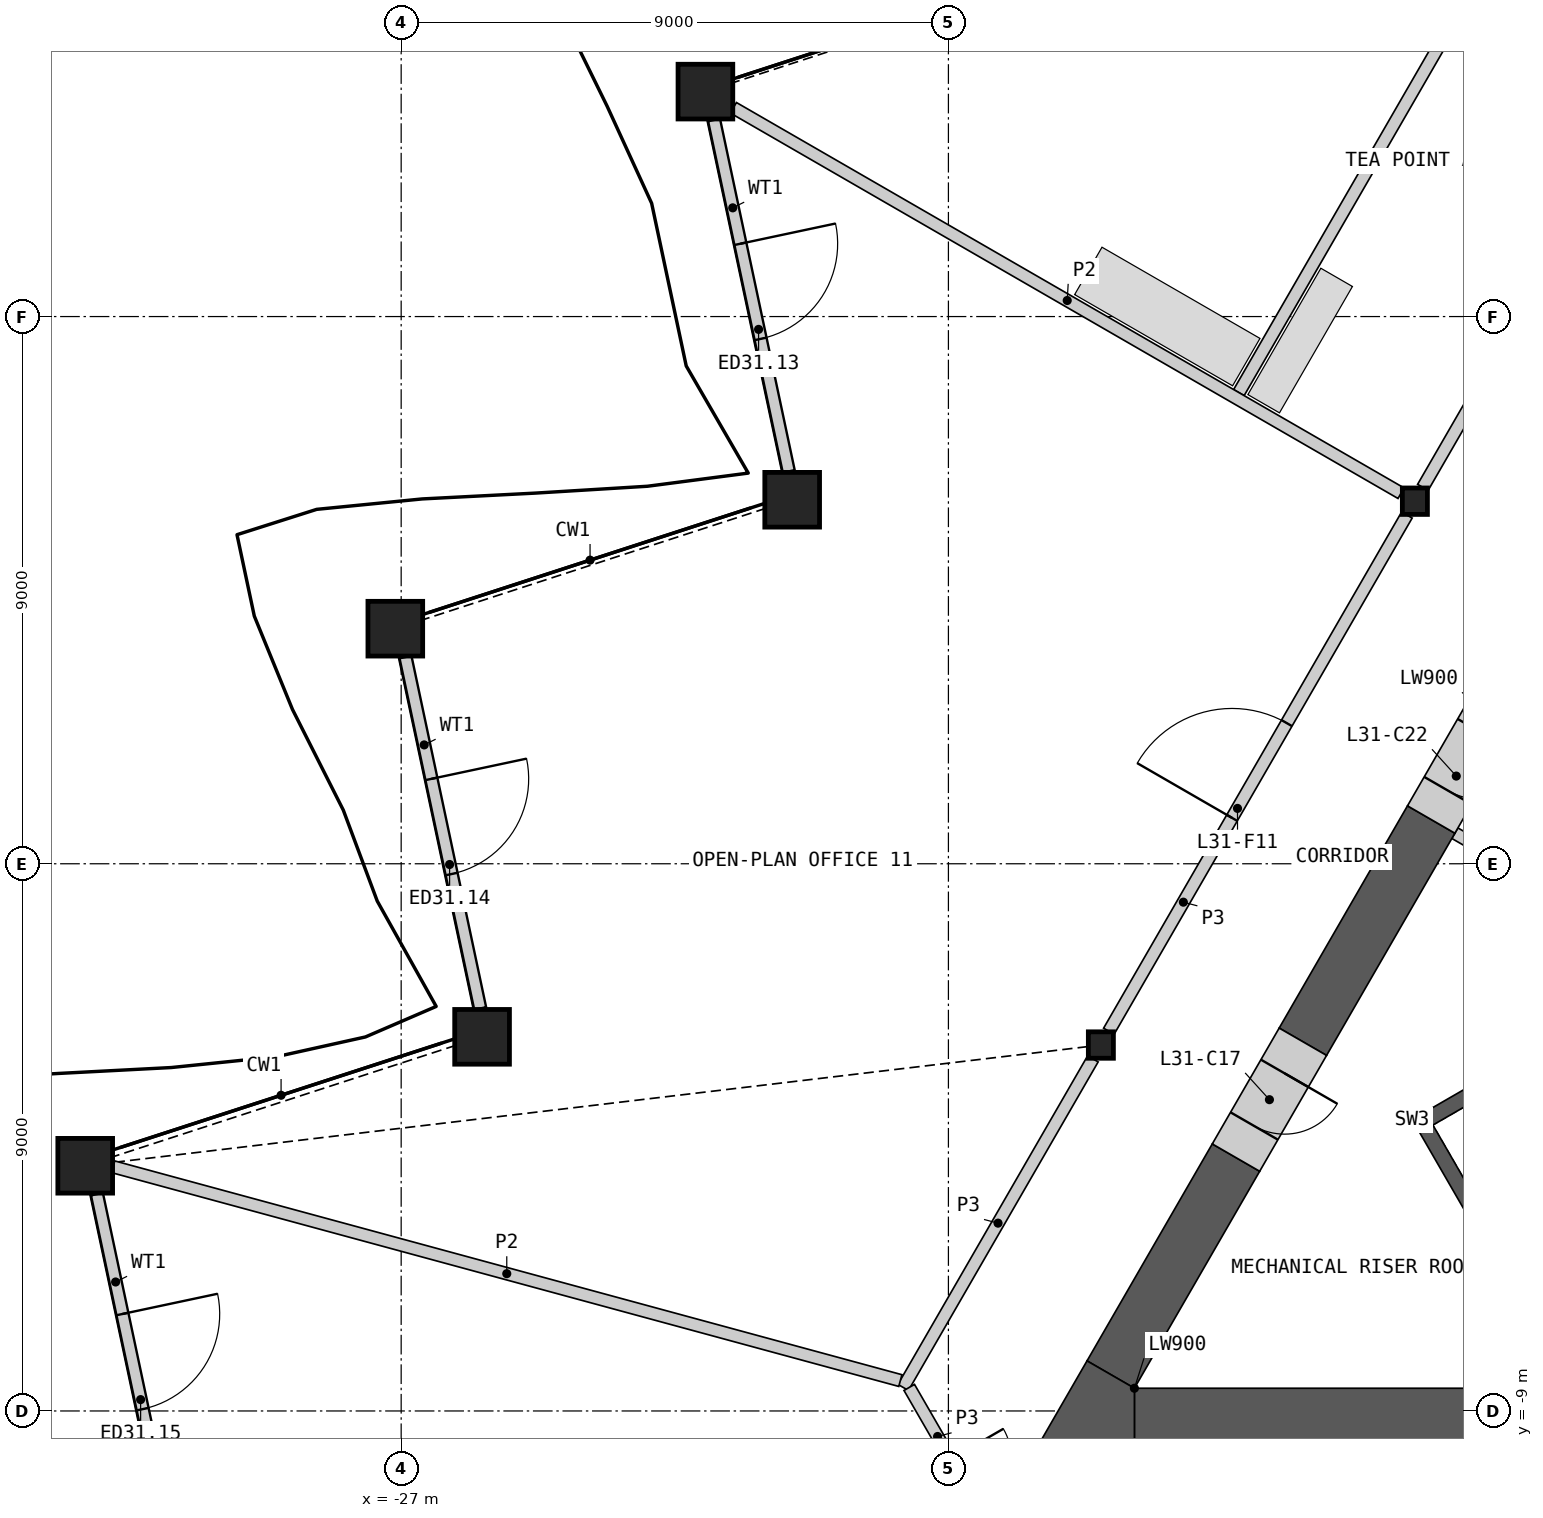
"""IFC4 building model, lengths in metres.
Left out: names, types, materials, properties, quantities, classifications, styles, units other than length and angle.
Written with IfcOpenShell. Run it as: python <this file> out.ifc"""

import sys

from ifc_helpers import new_model, si_unit, direction, frame, frame_2d, origin, origin_2d, place, context, subcontext, project, spatial, polyline, rectangle, hollow_rectangle, i_section, outline, extrude, element, fill, save


model = new_model("IFC4")
c1 = context("Model", 3, precision=1e-05, world=origin(), true_north=direction((0.0, 1.0)))
c2 = subcontext(c1, "Body", "Model", "MODEL_VIEW")
j1 = project(units=[si_unit("LENGTHUNIT", "METRE"), si_unit("PLANEANGLEUNIT", "RADIAN")], contexts=[c1])
p1 = place(None, origin())
s1 = spatial("IfcSite", under=j1, at=p1, CompositionType="ELEMENT")
p2 = place(p1, origin())
s2 = spatial("IfcBuilding", under=s1, at=p2, CompositionType="ELEMENT")
p3 = place(p2, frame((0.0, 0.0, 145.8)))
s3 = spatial("IfcBuildingStorey", under=s2, at=p3, CompositionType="ELEMENT", Elevation=145.8)
for number, where, z_axis, x_axis in (
    (1, (-21.996, 12.699, 0.0), (0.0, 0.0, 1.0), (1.0, 0.0, 0.0)),
    (2, (-20.57, 5.987, 0.0), (0.0, 0.0, 1.0), (1.0, 0.0, 0.0)),
    (3, (-27.096, 3.866, 0.0), (0.0, 0.0, 1.0), (1.0, 0.0, 0.0)),
    (4, (-25.669, -2.846, 0.0), (0.0, 0.0, 1.0), (1.0, 0.0, 0.0)),
    (5, (-32.196, -4.967, 0.0), (0.0, 0.0, 1.0), (1.0, 0.0, 0.0)),
):
    element("IfcColumn", number, at=place(p3, frame(where, z_axis=z_axis, x_axis=x_axis)), inside=s3, PredefinedType="COLUMN", context=c2, shape_type="SweptSolid", body=[
        extrude(hollow_rectangle(XDim=0.9, YDim=0.9, WallThickness=0.06, at=origin_2d()), origin(), (0.0, 0.0, 1.0), 4.2),
    ])
for number, where, z_axis, x_axis in (
    (6, (-10.328, 5.963, 0.0), (0.0, 0.0, 1.0), (1.0, 0.0, 0.0)),
    (7, (-15.493, -2.982, 0.0), (0.0, 0.0, 1.0), (1.0, 0.0, 0.0)),
):
    element("IfcColumn", number, at=place(p3, frame(where, z_axis=z_axis, x_axis=x_axis)), inside=s3, PredefinedType="COLUMN", context=c2, shape_type="SweptSolid", body=[
        extrude(i_section(OverallWidth=0.412, OverallDepth=0.435, WebThickness=0.036, FlangeThickness=0.057, at=origin_2d()), origin(), (0.0, 0.0, 1.0), 4.2),
    ])
p4 = place(p3, frame((-21.854, 12.233, 0.0), z_axis=(0.0, 0.0, 1.0), x_axis=(0.207925965623, -0.978144566421, 0.0)))
e8 = element("IfcWall", 8, at=p4, inside=s3, PredefinedType="SOLIDWALL", context=c2, shape_type="SweptSolid", body=[
    extrude(rectangle(XDim=5.908, YDim=0.2, at=frame_2d((2.954, 0.0))), origin(), (0.0, 0.0, 1.0), 3.189),
])
p5 = place(p4, frame((2.081, 0.0, 0.0)))
e9 = element("IfcOpeningElement", 9, at=p5, cuts=e8, PredefinedType="OPENING", context=c2, shape_type="SweptSolid", body=[
    extrude(rectangle(XDim=1.6, YDim=2.4, at=frame_2d((0.8, 1.2))), frame((0.0, 0.11, 0.0), z_axis=(0.0, -1.0, 0.0), x_axis=(1.0, 0.0, 0.0)), (0.0, 0.0, 1.0), 0.22),
])
p6 = place(p3, frame((-26.929, 3.4, 0.0), z_axis=(0.0, 0.0, 1.0), x_axis=(0.207917562075, -0.978146352741, 0.0)))
e10 = element("IfcWall", 10, at=p6, inside=s3, PredefinedType="SOLIDWALL", context=c2, shape_type="SweptSolid", body=[
    extrude(rectangle(XDim=5.909, YDim=0.2, at=frame_2d((2.954, 0.0))), origin(), (0.0, 0.0, 1.0), 3.189),
])
p7 = place(p6, frame((2.048, 0.0, 0.0)))
e11 = element("IfcOpeningElement", 11, at=p7, cuts=e10, PredefinedType="OPENING", context=c2, shape_type="SweptSolid", body=[
    extrude(rectangle(XDim=1.6, YDim=2.4, at=frame_2d((0.8, 1.2))), frame((0.0, 0.11, 0.0), z_axis=(0.0, -1.0, 0.0), x_axis=(1.0, 0.0, 0.0)), (0.0, 0.0, 1.0), 0.22),
])
p8 = place(p3, frame((-32.003, -5.434, 0.0), z_axis=(0.0, 0.0, 1.0), x_axis=(0.207886430801, -0.978152969575, 0.0)))
e12 = element("IfcWall", 12, at=p8, inside=s3, PredefinedType="SOLIDWALL", context=c2, shape_type="SweptSolid", body=[
    extrude(rectangle(XDim=5.908, YDim=0.2, at=frame_2d((2.954, 0.0))), origin(), (0.0, 0.0, 1.0), 3.189),
])
p9 = place(p8, frame((2.015, 0.0, 0.0)))
e13 = element("IfcOpeningElement", 13, at=p9, cuts=e12, PredefinedType="OPENING", context=c2, shape_type="SweptSolid", body=[
    extrude(rectangle(XDim=1.6, YDim=2.4, at=frame_2d((0.8, 1.2))), frame((0.0, 0.11, 0.0), z_axis=(0.0, -1.0, 0.0), x_axis=(1.0, 0.0, 0.0)), (0.0, 0.0, 1.0), 0.22),
])
p10 = place(p3, frame((-8.181, -0.357, 0.0), z_axis=(0.0, 0.0, 1.0), x_axis=(-0.866024871741, 0.500000921525, 0.0)))
e14 = element("IfcWall", 14, at=p10, inside=s3, PredefinedType="SHEAR", context=c2, shape_type="SweptSolid", body=[
    extrude(rectangle(XDim=1.72, YDim=0.2, at=frame_2d((0.86, 0.0))), origin(), (0.0, 0.0, 1.0), 3.8),
])
p11 = place(p3, origin())
e15 = element("IfcWall", 15, at=p11, inside=s3, PredefinedType="SHEAR", context=c2, shape_type="SweptSolid", body=[
    extrude(outline(polyline([(-5.307, -1.281), (-10.374, -4.206), (-10.032, -4.298), (-5.182, -1.498), (-5.307, -1.281)])), origin(), (0.0, 0.0, 1.0), 3.8),
])
p12 = place(p3, origin())
e16 = element("IfcWall", 16, at=p12, inside=s3, PredefinedType="SHEAR", context=c2, shape_type="SweptSolid", body=[
    extrude(outline(polyline([(-10.374, -4.206), (-8.83, -6.881), (-8.738, -6.539), (-10.032, -4.298), (-10.374, -4.206)])), origin(), (0.0, 0.0, 1.0), 3.8),
])
p13 = place(p3, frame((-14.941, -9.076, 0.0), z_axis=(0.0, 0.0, 1.0), x_axis=(1.0, 0.0, 0.0)))
e17 = element("IfcWall", 17, at=p13, inside=s3, PredefinedType="SHEAR", context=c2, shape_type="SweptSolid", body=[
    extrude(rectangle(XDim=7.649, YDim=0.9, at=frame_2d((3.824, 0.0))), origin(), (0.0, 0.0, 1.0), 3.8),
])
p14 = place(p3, frame((-10.06, 0.728, 0.0), z_axis=(0.0, 0.0, 1.0), x_axis=(-0.500021220092, -0.866013152012, 0.0)))
e18 = element("IfcWall", 18, at=p14, inside=s3, PredefinedType="SHEAR", context=c2, shape_type="SweptSolid", body=[
    extrude(rectangle(XDim=4.22, YDim=0.9, at=frame_2d((2.11, 0.0))), origin(), (0.0, 0.0, 1.0), 3.8),
])
p15 = place(p3, frame((-13.271, -4.833, 0.0), z_axis=(0.0, 0.0, 1.0), x_axis=(-0.499994272862, -0.866028710324, 0.0)))
e19 = element("IfcWall", 19, at=p15, inside=s3, PredefinedType="SHEAR", context=c2, shape_type="SweptSolid", body=[
    extrude(rectangle(XDim=4.121, YDim=0.9, at=frame_2d((2.06, 0.0))), origin(), (0.0, 0.0, 1.0), 3.8),
])
p16 = place(p3, origin())
e20 = element("IfcWall", 20, at=p16, inside=s3, PredefinedType="SHEAR", context=c2, shape_type="SweptSolid", body=[
    extrude(outline(polyline([(-14.941, -8.626), (-14.941, -9.526), (-16.5, -9.526), (-15.721, -8.176), (-14.941, -8.626)])), origin(), (0.0, 0.0, 1.0), 3.8),
])
p17 = place(p3, frame((-12.171, -2.927, 0.0), z_axis=(0.0, 0.0, 1.0), x_axis=(-0.499946605688, -0.86605622881, 0.0)))
e21 = element("IfcWall", 21, at=p17, inside=s3, PredefinedType="SHEAR", context=c2, shape_type="SweptSolid", body=[
    extrude(rectangle(XDim=2.2, YDim=0.9, at=frame_2d((1.1, 0.0))), origin(), (0.0, 0.0, 1.0), 3.8),
])
p18 = place(p17, frame((0.6, 0.0, 0.0)))
e22 = element("IfcOpeningElement", 22, at=p18, cuts=e21, PredefinedType="OPENING", context=c2, shape_type="SweptSolid", body=[
    extrude(rectangle(XDim=1.0, YDim=2.1, at=frame_2d((0.5, 1.05))), frame((0.0, 0.46, 0.0), z_axis=(0.0, -1.0, 0.0), x_axis=(1.0, 0.0, 0.0)), (0.0, 0.0, 1.0), 0.92),
])
p19 = place(p3, frame((-8.96, 2.633, 0.0), z_axis=(0.0, 0.0, 1.0), x_axis=(-0.50002983664, -0.866008176907, 0.0)))
e23 = element("IfcWall", 23, at=p19, inside=s3, PredefinedType="SHEAR", context=c2, shape_type="SweptSolid", body=[
    extrude(rectangle(XDim=2.2, YDim=0.9, at=frame_2d((1.1, 0.0))), origin(), (0.0, 0.0, 1.0), 3.8),
])
p20 = place(p19, frame((0.55, 0.0, 0.0)))
e24 = element("IfcOpeningElement", 24, at=p20, cuts=e23, PredefinedType="OPENING", context=c2, shape_type="SweptSolid", body=[
    extrude(rectangle(XDim=1.1, YDim=2.1, at=frame_2d((0.55, 1.05))), frame((0.0, 0.46, 0.0), z_axis=(0.0, -1.0, 0.0), x_axis=(1.0, 0.0, 0.0)), (0.0, 0.0, 1.0), 0.92),
])
p21 = place(p3, frame((-15.361, -2.754, 0.0), z_axis=(0.0, 0.0, 1.0), x_axis=(0.500004141693, 0.866023012564, 0.0)))
e25 = element("IfcWall", 25, at=p21, inside=s3, PredefinedType="PARTITIONING", context=c2, shape_type="SweptSolid", body=[
    extrude(rectangle(XDim=9.803, YDim=0.2, at=frame_2d((4.902, 0.0))), origin(), (0.0, 0.0, 1.0), 3.8),
])
p22 = place(p21, frame((4.052, 0.0, 0.0)))
e26 = element("IfcOpeningElement", 26, at=p22, cuts=e25, PredefinedType="OPENING", context=c2, shape_type="SweptSolid", body=[
    extrude(rectangle(XDim=1.8, YDim=2.1, at=frame_2d((0.9, 1.05))), frame((0.0, 0.11, 0.0), z_axis=(0.0, -1.0, 0.0), x_axis=(1.0, 0.0, 0.0)), (0.0, 0.0, 1.0), 0.22),
])
p23 = place(p3, frame((-10.197, 6.19, 0.0), z_axis=(0.0, 0.0, 1.0), x_axis=(0.500012035596, 0.866018454918, 0.0)))
e27 = element("IfcWall", 27, at=p23, inside=s3, PredefinedType="PARTITIONING", context=c2, shape_type="SweptSolid", body=[
    extrude(rectangle(XDim=9.803, YDim=0.2, at=frame_2d((4.902, 0.0))), origin(), (0.0, 0.0, 1.0), 3.8),
])
p24 = place(p23, frame((4.376, 0.0, 0.0)))
e28 = element("IfcOpeningElement", 28, at=p24, cuts=e27, PredefinedType="OPENING", context=c2, shape_type="SweptSolid", body=[
    extrude(rectangle(XDim=0.95, YDim=2.1, at=frame_2d((0.475, 1.05))), frame((0.0, 0.11, 0.0), z_axis=(0.0, -1.0, 0.0), x_axis=(1.0, 0.0, 0.0)), (0.0, 0.0, 1.0), 0.22),
])
p25 = place(p3, frame((-18.744, -8.613, 0.0), z_axis=(0.0, 0.0, 1.0), x_axis=(0.499997920671, 0.866026604282, 0.0)))
e29 = element("IfcWall", 29, at=p25, inside=s3, PredefinedType="PARTITIONING", context=c2, shape_type="SweptSolid", body=[
    extrude(rectangle(XDim=6.24, YDim=0.2, at=frame_2d((3.12, 0.0))), origin(), (0.0, 0.0, 1.0), 3.8),
])
p26 = place(p3, frame((-18.644, -8.613, 0.0), z_axis=(0.0, 0.0, 1.0), x_axis=(0.499958791762, -0.866049194065, 0.0)))
e30 = element("IfcWall", 30, at=p26, inside=s3, PredefinedType="PARTITIONING", context=c2, shape_type="SweptSolid", body=[
    extrude(rectangle(XDim=3.726, YDim=0.2, at=frame_2d((1.863, 0.0))), origin(), (0.0, 0.0, 1.0), 3.8),
])
p27 = place(p26, frame((1.363, 0.0, 0.0)))
e31 = element("IfcOpeningElement", 31, at=p27, cuts=e30, PredefinedType="OPENING", context=c2, shape_type="SweptSolid", body=[
    extrude(rectangle(XDim=1.0, YDim=2.1, at=frame_2d((0.5, 1.05))), frame((0.0, 0.11, 0.0), z_axis=(0.0, -1.0, 0.0), x_axis=(1.0, 0.0, 0.0)), (0.0, 0.0, 1.0), 0.22),
])
p28 = place(p3, frame((-13.223, 7.75, 0.0), z_axis=(0.0, 0.0, 1.0), x_axis=(0.499991226912, 0.86603046887, 0.0)))
e32 = element("IfcWall", 32, at=p28, inside=s3, PredefinedType="PARTITIONING", context=c2, shape_type="SweptSolid", body=[
    extrude(rectangle(XDim=17.429, YDim=0.2, at=frame_2d((8.715, 0.0))), origin(), (0.0, 0.0, 1.0), 2.885),
])
p29 = place(p28, frame((8.792, 0.0, 0.0)))
e33 = element("IfcOpeningElement", 33, at=p29, cuts=e32, PredefinedType="OPENING", context=c2, shape_type="SweptSolid", body=[
    extrude(rectangle(XDim=0.95, YDim=2.1, at=frame_2d((0.475, 1.05))), frame((0.0, 0.11, 0.0), z_axis=(0.0, -1.0, 0.0), x_axis=(1.0, 0.0, 0.0)), (0.0, 0.0, 1.0), 0.22),
])
p30 = place(p3, frame((-31.736, -4.984, 0.0), z_axis=(0.0, 0.0, 1.0), x_axis=(0.965038802525, -0.262107057556, 0.0)))
e34 = element("IfcWall", 34, at=p30, inside=s3, PredefinedType="PARTITIONING", context=c2, shape_type="SweptSolid", body=[
    extrude(rectangle(XDim=13.415, YDim=0.2, at=frame_2d((6.708, 0.0))), origin(), (0.0, 0.0, 1.0), 2.885),
])
p31 = place(p3, frame((-21.536, 12.434, 0.0), z_axis=(0.0, 0.0, 1.0), x_axis=(0.86602461759, -0.500001361726, 0.0)))
e35 = element("IfcWall", 35, at=p31, inside=s3, PredefinedType="PARTITIONING", context=c2, shape_type="SweptSolid", body=[
    extrude(rectangle(XDim=12.679, YDim=0.2, at=frame_2d((6.34, 0.0))), origin(), (0.0, 0.0, 1.0), 2.885),
])
p32 = place(p5, origin())
e36 = element("IfcDoor", 36, at=p32, inside=s3, OperationType="DOUBLE_DOOR_SINGLE_SWING", PredefinedType="DOOR", context=c2, shape_type="SweptSolid", body=[
    extrude(rectangle(XDim=1.6, YDim=2.4, at=frame_2d((0.8, 1.2))), frame((0.0, 0.025, 0.0), z_axis=(0.0, -1.0, 0.0), x_axis=(1.0, 0.0, 0.0)), (0.0, 0.0, 1.0), 0.05),
])
fill(e9, e36)
p33 = place(p7, origin())
e37 = element("IfcDoor", 37, at=p33, inside=s3, OperationType="DOUBLE_DOOR_SINGLE_SWING", PredefinedType="DOOR", context=c2, shape_type="SweptSolid", body=[
    extrude(rectangle(XDim=1.6, YDim=2.4, at=frame_2d((0.8, 1.2))), frame((0.0, 0.025, 0.0), z_axis=(0.0, -1.0, 0.0), x_axis=(1.0, 0.0, 0.0)), (0.0, 0.0, 1.0), 0.05),
])
fill(e11, e37)
p34 = place(p9, origin())
e38 = element("IfcDoor", 38, at=p34, inside=s3, OperationType="DOUBLE_DOOR_SINGLE_SWING", PredefinedType="DOOR", context=c2, shape_type="SweptSolid", body=[
    extrude(rectangle(XDim=1.6, YDim=2.4, at=frame_2d((0.8, 1.2))), frame((0.0, 0.025, 0.0), z_axis=(0.0, -1.0, 0.0), x_axis=(1.0, 0.0, 0.0)), (0.0, 0.0, 1.0), 0.05),
])
fill(e13, e38)
p35 = place(p18, origin())
e39 = element("IfcDoor", 39, at=p35, inside=s3, OperationType="SINGLE_SWING_LEFT", PredefinedType="DOOR", context=c2, shape_type="SweptSolid", body=[
    extrude(rectangle(XDim=1.0, YDim=2.1, at=frame_2d((0.5, 1.05))), frame((0.0, 0.205, 0.0), z_axis=(0.0, -1.0, 0.0), x_axis=(1.0, 0.0, 0.0)), (0.0, 0.0, 1.0), 0.05),
])
fill(e22, e39)
p36 = place(p20, origin())
e40 = element("IfcDoor", 40, at=p36, inside=s3, OperationType="SINGLE_SWING_LEFT", PredefinedType="DOOR", context=c2, shape_type="SweptSolid", body=[
    extrude(rectangle(XDim=1.1, YDim=2.1, at=frame_2d((0.55, 1.05))), frame((0.0, 0.205, 0.0), z_axis=(0.0, -1.0, 0.0), x_axis=(1.0, 0.0, 0.0)), (0.0, 0.0, 1.0), 0.05),
])
fill(e24, e40)
p37 = place(p22, origin())
e41 = element("IfcDoor", 41, at=p37, inside=s3, OperationType="DOUBLE_DOOR_SINGLE_SWING", PredefinedType="DOOR", context=c2, shape_type="SweptSolid", body=[
    extrude(rectangle(XDim=1.8, YDim=2.1, at=frame_2d((0.9, 1.05))), frame((0.0, 0.025, 0.0), z_axis=(0.0, -1.0, 0.0), x_axis=(1.0, 0.0, 0.0)), (0.0, 0.0, 1.0), 0.05),
])
fill(e26, e41)
save(model, sys.argv[1])
